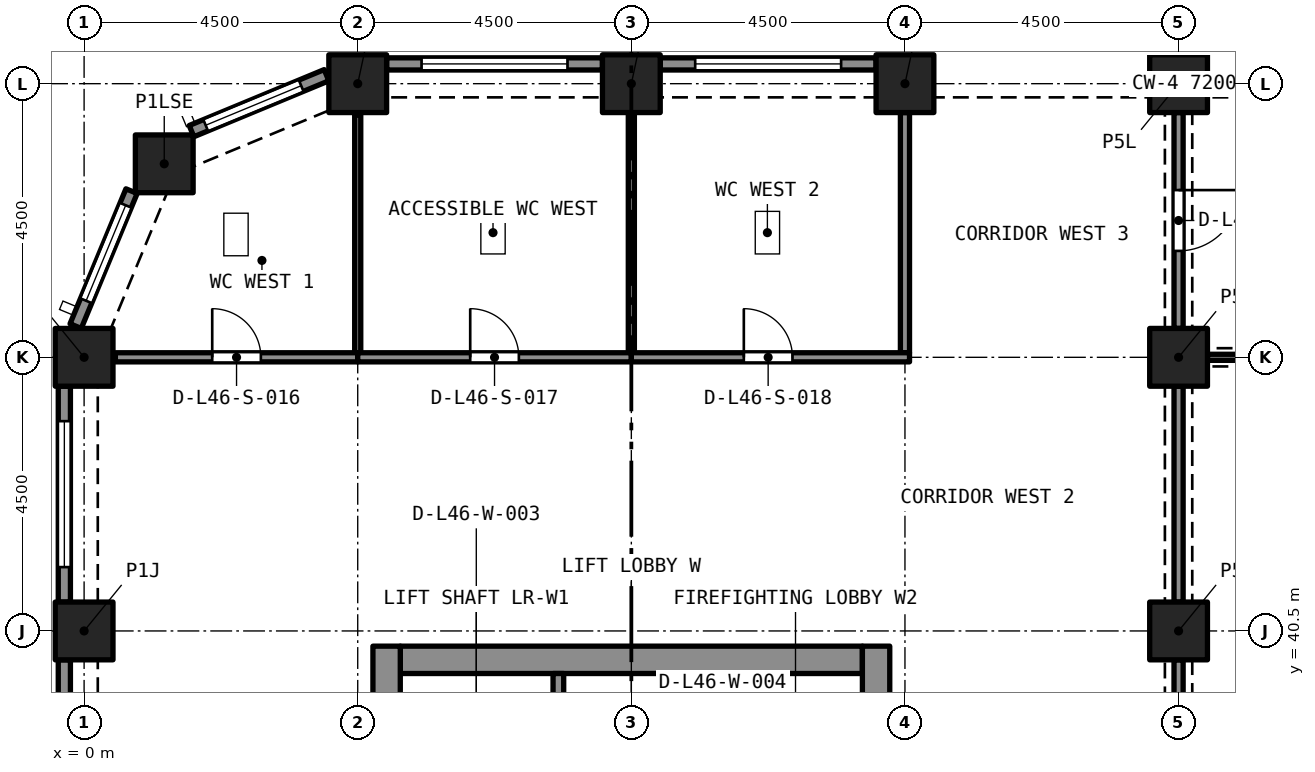
"""IFC4 building model, lengths in metres.
Left out: names, types, materials, properties, quantities, classifications, styles, units other than length and angle.
Written with IfcOpenShell. Run it as: python <this file> out.ifc"""

import sys

from ifc_helpers import new_model, si_unit, direction, frame, frame_2d, origin, origin_2d, place, context, subcontext, project, spatial, rectangle, extrude, element, fill, save


model = new_model("IFC4")
c1 = context("Model", 3, precision=1e-05, world=origin(), true_north=direction((0.0, 1.0)))
c2 = subcontext(c1, "Body", "Model", "MODEL_VIEW")
j1 = project(units=[si_unit("LENGTHUNIT", "METRE"), si_unit("PLANEANGLEUNIT", "RADIAN")], contexts=[c1])
p1 = place(None, origin())
s1 = spatial("IfcSite", under=j1, at=p1, CompositionType="ELEMENT")
p2 = place(p1, origin())
s2 = spatial("IfcBuilding", under=s1, at=p2, CompositionType="ELEMENT")
p3 = place(p2, frame((0.0, 0.0, 168.2)))
s3 = spatial("IfcBuildingStorey", under=s2, at=p3, CompositionType="ELEMENT", Elevation=168.2)
for number, where, z_axis, x_axis in (
    (1, (0.0, 40.5, 0.0), (0.0, 0.0, 1.0), (1.0, 0.0, 0.0)),
    (2, (18.0, 40.5, 0.0), (0.0, 0.0, 1.0), (1.0, 0.0, 0.0)),
    (3, (0.0, 45.0, 0.0), (0.0, 0.0, 1.0), (1.0, 0.0, 0.0)),
    (4, (18.0, 45.0, 0.0), (0.0, 0.0, 1.0), (1.0, 0.0, 0.0)),
    (5, (1.318, 48.182, 0.0), (0.0, 0.0, 1.0), (1.0, 0.0, 0.0)),
    (6, (4.5, 49.5, 0.0), (0.0, 0.0, 1.0), (1.0, 0.0, 0.0)),
    (7, (9.0, 49.5, 0.0), (0.0, 0.0, 1.0), (1.0, 0.0, 0.0)),
    (8, (13.5, 49.5, 0.0), (0.0, 0.0, 1.0), (1.0, 0.0, 0.0)),
    (9, (18.0, 49.5, 0.0), (0.0, 0.0, 1.0), (1.0, 0.0, 0.0)),
):
    element("IfcColumn", number, at=place(p3, frame(where, z_axis=z_axis, x_axis=x_axis)), inside=s3, PredefinedType="COLUMN", context=c2, shape_type="SweptSolid", body=[
        extrude(rectangle(XDim=0.95, YDim=0.95, at=origin_2d()), origin(), (0.0, 0.0, 1.0), 4.4),
    ])
p4 = place(p3, frame((5.2, 40.025, 0.0), z_axis=(0.0, 0.0, 1.0), x_axis=(1.0, 0.0, 0.0)))
e10 = element("IfcWall", 10, at=p4, inside=s3, PredefinedType="SOLIDWALL", context=c2, shape_type="SweptSolid", body=[
    extrude(rectangle(XDim=7.6, YDim=0.45, at=frame_2d((3.8, 0.0))), origin(), (0.0, 0.0, 1.0), 4.4),
])
p5 = place(p3, frame((4.975, 27.25, 0.0), z_axis=(0.0, 0.0, 1.0), x_axis=(0.0, 1.0, 0.0)))
e11 = element("IfcWall", 11, at=p5, inside=s3, PredefinedType="SOLIDWALL", context=c2, shape_type="SweptSolid", body=[
    extrude(rectangle(XDim=13.0, YDim=0.45, at=frame_2d((6.5, 0.0))), origin(), (0.0, 0.0, 1.0), 4.4),
])
p6 = place(p5, frame((8.7, 0.0, 0.0)))
e12 = element("IfcOpeningElement", 12, at=p6, cuts=e11, PredefinedType="OPENING", context=c2, shape_type="SweptSolid", body=[
    extrude(rectangle(XDim=1.2, YDim=2.1, at=frame_2d((0.6, 1.05))), frame((0.0, 0.235, 0.0), z_axis=(0.0, -1.0, 0.0), x_axis=(1.0, 0.0, 0.0)), (0.0, 0.0, 1.0), 0.47),
])
p7 = place(p3, frame((13.025, 27.25, 0.0), z_axis=(0.0, 0.0, 1.0), x_axis=(0.0, 1.0, 0.0)))
e13 = element("IfcWall", 13, at=p7, inside=s3, PredefinedType="SOLIDWALL", context=c2, shape_type="SweptSolid", body=[
    extrude(rectangle(XDim=13.0, YDim=0.45, at=frame_2d((6.5, 0.0))), origin(), (0.0, 0.0, 1.0), 4.4),
])
p8 = place(p7, frame((10.85, 0.0, 0.0)))
e14 = element("IfcOpeningElement", 14, at=p8, cuts=e13, PredefinedType="OPENING", context=c2, shape_type="SweptSolid", body=[
    extrude(rectangle(XDim=1.1, YDim=2.1, at=frame_2d((0.55, 1.05))), frame((0.0, 0.235, 0.0), z_axis=(0.0, -1.0, 0.0), x_axis=(1.0, 0.0, 0.0)), (0.0, 0.0, 1.0), 0.47),
])
p9 = place(p7, frame((8.7, 0.0, 0.0)))
e15 = element("IfcOpeningElement", 15, at=p9, cuts=e13, PredefinedType="OPENING", context=c2, shape_type="SweptSolid", body=[
    extrude(rectangle(XDim=1.2, YDim=2.1, at=frame_2d((0.6, 1.05))), frame((0.0, 0.235, 0.0), z_axis=(0.0, -1.0, 0.0), x_axis=(1.0, 0.0, 0.0)), (0.0, 0.0, 1.0), 0.47),
])
p10 = place(p3, frame((9.475, 49.825, 0.0), z_axis=(0.0, 0.0, 1.0), x_axis=(1.0, 0.0, 0.0)))
e16 = element("IfcWall", 16, at=p10, inside=s3, PredefinedType="SOLIDWALL", context=c2, shape_type="SweptSolid", body=[
    extrude(rectangle(XDim=3.55, YDim=0.2, at=frame_2d((1.775, 0.0))), origin(), (0.0, 0.0, 1.0), 4.4),
])
p11 = place(p10, frame((0.575, 0.0, 0.45)))
e17 = element("IfcOpeningElement", 17, at=p11, cuts=e16, PredefinedType="OPENING", context=c2, shape_type="SweptSolid", body=[
    extrude(rectangle(XDim=2.4, YDim=2.55, at=frame_2d((1.2, 1.275))), frame((0.0, 0.11, 0.0), z_axis=(0.0, -1.0, 0.0), x_axis=(1.0, 0.0, 0.0)), (0.0, 0.0, 1.0), 0.22),
])
p12 = place(p3, frame((4.975, 49.825, 0.0), z_axis=(0.0, 0.0, 1.0), x_axis=(1.0, 0.0, 0.0)))
e18 = element("IfcWall", 18, at=p12, inside=s3, PredefinedType="SOLIDWALL", context=c2, shape_type="SweptSolid", body=[
    extrude(rectangle(XDim=3.55, YDim=0.2, at=frame_2d((1.775, 0.0))), origin(), (0.0, 0.0, 1.0), 4.4),
])
p13 = place(p12, frame((0.575, 0.0, 0.45)))
e19 = element("IfcOpeningElement", 19, at=p13, cuts=e18, PredefinedType="OPENING", context=c2, shape_type="SweptSolid", body=[
    extrude(rectangle(XDim=2.4, YDim=2.55, at=frame_2d((1.2, 1.275))), frame((0.0, 0.11, 0.0), z_axis=(0.0, -1.0, 0.0), x_axis=(1.0, 0.0, 0.0)), (0.0, 0.0, 1.0), 0.22),
])
p14 = place(p3, frame((1.767, 48.72, 0.0), z_axis=(0.0, 0.0, 1.0), x_axis=(0.923880599843, 0.382680855588, 0.0)))
e20 = element("IfcWall", 20, at=p14, inside=s3, PredefinedType="SOLIDWALL", context=c2, shape_type="SweptSolid", body=[
    extrude(rectangle(XDim=2.403, YDim=0.2, at=frame_2d((1.201, 0.0))), origin(), (0.0, 0.0, 1.0), 4.4),
])
p15 = place(p14, frame((0.251, 0.0, 0.45)))
e21 = element("IfcOpeningElement", 21, at=p15, cuts=e20, PredefinedType="OPENING", context=c2, shape_type="SweptSolid", body=[
    extrude(rectangle(XDim=1.7, YDim=2.55, at=frame_2d((0.85, 1.275))), frame((0.0, 0.11, 0.0), z_axis=(0.0, -1.0, 0.0), x_axis=(1.0, 0.0, 0.0)), (0.0, 0.0, 1.0), 0.22),
])
p16 = place(p3, frame((-0.139, 45.513, 0.0), z_axis=(0.0, 0.0, 1.0), x_axis=(0.382680855588, 0.923880599843, 0.0)))
e22 = element("IfcWall", 22, at=p16, inside=s3, PredefinedType="SOLIDWALL", context=c2, shape_type="SweptSolid", body=[
    extrude(rectangle(XDim=2.403, YDim=0.2, at=frame_2d((1.201, 0.0))), origin(), (0.0, 0.0, 1.0), 4.4),
])
p17 = place(p16, frame((0.451, 0.0, 0.45)))
e23 = element("IfcOpeningElement", 23, at=p17, cuts=e22, PredefinedType="OPENING", context=c2, shape_type="SweptSolid", body=[
    extrude(rectangle(XDim=1.7, YDim=2.55, at=frame_2d((0.85, 1.275))), frame((0.0, 0.11, 0.0), z_axis=(0.0, -1.0, 0.0), x_axis=(1.0, 0.0, 0.0)), (0.0, 0.0, 1.0), 0.22),
])
p18 = place(p3, frame((-0.325, 40.975, 0.0), z_axis=(0.0, 0.0, 1.0), x_axis=(0.0, 1.0, 0.0)))
e24 = element("IfcWall", 24, at=p18, inside=s3, PredefinedType="SOLIDWALL", context=c2, shape_type="SweptSolid", body=[
    extrude(rectangle(XDim=3.55, YDim=0.2, at=frame_2d((1.775, 0.0))), origin(), (0.0, 0.0, 1.0), 4.4),
])
p19 = place(p18, frame((0.575, 0.0, 0.45)))
e25 = element("IfcOpeningElement", 25, at=p19, cuts=e24, PredefinedType="OPENING", context=c2, shape_type="SweptSolid", body=[
    extrude(rectangle(XDim=2.4, YDim=2.55, at=frame_2d((1.2, 1.275))), frame((0.0, 0.11, 0.0), z_axis=(0.0, -1.0, 0.0), x_axis=(1.0, 0.0, 0.0)), (0.0, 0.0, 1.0), 0.22),
])
p20 = place(p3, frame((-0.325, 36.475, 0.0), z_axis=(0.0, 0.0, 1.0), x_axis=(0.0, 1.0, 0.0)))
e26 = element("IfcWall", 26, at=p20, inside=s3, PredefinedType="SOLIDWALL", context=c2, shape_type="SweptSolid", body=[
    extrude(rectangle(XDim=3.55, YDim=0.2, at=frame_2d((1.775, 0.0))), origin(), (0.0, 0.0, 1.0), 4.4),
])
p21 = place(p20, frame((0.575, 0.0, 0.45)))
e27 = element("IfcOpeningElement", 27, at=p21, cuts=e26, PredefinedType="OPENING", context=c2, shape_type="SweptSolid", body=[
    extrude(rectangle(XDim=2.4, YDim=2.55, at=frame_2d((1.2, 1.275))), frame((0.0, 0.11, 0.0), z_axis=(0.0, -1.0, 0.0), x_axis=(1.0, 0.0, 0.0)), (0.0, 0.0, 1.0), 0.22),
])
p22 = place(p3, frame((7.8, 37.5, 0.0), z_axis=(0.0, 0.0, 1.0), x_axis=(0.0, 1.0, 0.0)))
e28 = element("IfcWall", 28, at=p22, inside=s3, PredefinedType="SOLIDWALL", context=c2, shape_type="SweptSolid", body=[
    extrude(rectangle(XDim=2.3, YDim=0.175, at=frame_2d((1.15, 0.0))), origin(), (0.0, 0.0, 1.0), 4.1),
])
p23 = place(p3, frame((10.5, 37.5, 0.0), z_axis=(0.0, 0.0, 1.0), x_axis=(0.0, 1.0, 0.0)))
e29 = element("IfcWall", 29, at=p23, inside=s3, PredefinedType="SOLIDWALL", context=c2, shape_type="SweptSolid", body=[
    extrude(rectangle(XDim=2.3, YDim=0.175, at=frame_2d((1.15, 0.0))), origin(), (0.0, 0.0, 1.0), 4.1),
])
p24 = place(p23, frame((0.65, 0.0, 0.0)))
e30 = element("IfcOpeningElement", 30, at=p24, cuts=e29, PredefinedType="OPENING", context=c2, shape_type="SweptSolid", body=[
    extrude(rectangle(XDim=1.0, YDim=2.1, at=frame_2d((0.5, 1.05))), frame((0.0, 0.097, 0.0), z_axis=(0.0, -1.0, 0.0), x_axis=(1.0, 0.0, 0.0)), (0.0, 0.0, 1.0), 0.195),
])
p25 = place(p3, frame((18.475, 45.0, 0.0), z_axis=(0.0, 0.0, 1.0), x_axis=(1.0, 0.0, 0.0)))
e31 = element("IfcWall", 31, at=p25, inside=s3, PredefinedType="PARTITIONING", context=c2, shape_type="SweptSolid", body=[
    extrude(rectangle(XDim=12.55, YDim=0.1, at=frame_2d((6.275, 0.0))), origin(), (0.0, 0.0, 1.0), 3.95),
])
p26 = place(p3, frame((18.0, 40.025, 0.0), z_axis=(0.0, 0.0, 1.0), x_axis=(0.0, -1.0, 0.0)))
e32 = element("IfcWall", 32, at=p26, inside=s3, PredefinedType="PARTITIONING", context=c2, shape_type="SweptSolid", body=[
    extrude(rectangle(XDim=3.55, YDim=0.15, at=frame_2d((1.775, 0.0))), origin(), (0.0, 0.0, 1.0), 3.58),
])
p27 = place(p26, frame((1.175, 0.0, 0.0)))
e33 = element("IfcOpeningElement", 33, at=p27, cuts=e32, PredefinedType="OPENING", context=c2, shape_type="SweptSolid", body=[
    extrude(rectangle(XDim=1.2, YDim=2.1, at=frame_2d((0.6, 1.05))), frame((0.0, 0.085, 0.0), z_axis=(0.0, -1.0, 0.0), x_axis=(1.0, 0.0, 0.0)), (0.0, 0.0, 1.0), 0.17),
])
p28 = place(p3, frame((18.0, 40.975, 0.0), z_axis=(0.0, 0.0, 1.0), x_axis=(0.0, 1.0, 0.0)))
e34 = element("IfcWall", 34, at=p28, inside=s3, PredefinedType="PARTITIONING", context=c2, shape_type="SweptSolid", body=[
    extrude(rectangle(XDim=3.55, YDim=0.15, at=frame_2d((1.775, 0.0))), origin(), (0.0, 0.0, 1.0), 3.58),
])
p29 = place(p3, frame((18.0, 49.025, 0.0), z_axis=(0.0, 0.0, 1.0), x_axis=(0.0, -1.0, 0.0)))
e35 = element("IfcWall", 35, at=p29, inside=s3, PredefinedType="PARTITIONING", context=c2, shape_type="SweptSolid", body=[
    extrude(rectangle(XDim=3.55, YDim=0.15, at=frame_2d((1.775, 0.0))), origin(), (0.0, 0.0, 1.0), 3.58),
])
p30 = place(p29, frame((1.275, 0.0, 0.0)))
e36 = element("IfcOpeningElement", 36, at=p30, cuts=e35, PredefinedType="OPENING", context=c2, shape_type="SweptSolid", body=[
    extrude(rectangle(XDim=1.0, YDim=2.1, at=frame_2d((0.5, 1.05))), frame((0.0, 0.085, 0.0), z_axis=(0.0, -1.0, 0.0), x_axis=(1.0, 0.0, 0.0)), (0.0, 0.0, 1.0), 0.17),
])
p31 = place(p3, frame((4.5, 45.075, 0.0), z_axis=(0.0, 0.0, 1.0), x_axis=(0.0, 1.0, 0.0)))
e37 = element("IfcWall", 37, at=p31, inside=s3, PredefinedType="PARTITIONING", context=c2, shape_type="SweptSolid", body=[
    extrude(rectangle(XDim=3.911, YDim=0.1, at=frame_2d((1.956, 0.0))), origin(), (0.0, 0.0, 1.0), 4.1),
])
p32 = place(p3, frame((0.514, 45.0, 0.0), z_axis=(0.0, 0.0, 1.0), x_axis=(1.0, 0.0, 0.0)))
e38 = element("IfcWall", 38, at=p32, inside=s3, PredefinedType="PARTITIONING", context=c2, shape_type="SweptSolid", body=[
    extrude(rectangle(XDim=3.986, YDim=0.15, at=frame_2d((1.993, 0.0))), origin(), (0.0, 0.0, 1.0), 4.1),
])
p33 = place(p32, frame((1.593, 0.0, 0.0)))
e39 = element("IfcOpeningElement", 39, at=p33, cuts=e38, PredefinedType="OPENING", context=c2, shape_type="SweptSolid", body=[
    extrude(rectangle(XDim=0.8, YDim=2.1, at=frame_2d((0.4, 1.05))), frame((0.0, 0.085, 0.0), z_axis=(0.0, -1.0, 0.0), x_axis=(1.0, 0.0, 0.0)), (0.0, 0.0, 1.0), 0.17),
])
p34 = place(p3, frame((9.0, 45.075, 0.0), z_axis=(0.0, 0.0, 1.0), x_axis=(0.0, 1.0, 0.0)))
e40 = element("IfcWall", 40, at=p34, inside=s3, PredefinedType="PARTITIONING", context=c2, shape_type="SweptSolid", body=[
    extrude(rectangle(XDim=3.95, YDim=0.1, at=frame_2d((1.975, 0.0))), origin(), (0.0, 0.0, 1.0), 4.1),
])
p35 = place(p3, frame((4.5, 45.0, 0.0), z_axis=(0.0, 0.0, 1.0), x_axis=(1.0, 0.0, 0.0)))
e41 = element("IfcWall", 41, at=p35, inside=s3, PredefinedType="PARTITIONING", context=c2, shape_type="SweptSolid", body=[
    extrude(rectangle(XDim=4.5, YDim=0.15, at=frame_2d((2.25, 0.0))), origin(), (0.0, 0.0, 1.0), 4.1),
])
p36 = place(p35, frame((1.85, 0.0, 0.0)))
e42 = element("IfcOpeningElement", 42, at=p36, cuts=e41, PredefinedType="OPENING", context=c2, shape_type="SweptSolid", body=[
    extrude(rectangle(XDim=0.8, YDim=2.1, at=frame_2d((0.4, 1.05))), frame((0.0, 0.085, 0.0), z_axis=(0.0, -1.0, 0.0), x_axis=(1.0, 0.0, 0.0)), (0.0, 0.0, 1.0), 0.17),
])
p37 = place(p3, frame((13.5, 45.075, 0.0), z_axis=(0.0, 0.0, 1.0), x_axis=(0.0, 1.0, 0.0)))
e43 = element("IfcWall", 43, at=p37, inside=s3, PredefinedType="PARTITIONING", context=c2, shape_type="SweptSolid", body=[
    extrude(rectangle(XDim=3.95, YDim=0.15, at=frame_2d((1.975, 0.0))), origin(), (0.0, 0.0, 1.0), 4.1),
])
p38 = place(p3, frame((9.0, 45.0, 0.0), z_axis=(0.0, 0.0, 1.0), x_axis=(1.0, 0.0, 0.0)))
e44 = element("IfcWall", 44, at=p38, inside=s3, PredefinedType="PARTITIONING", context=c2, shape_type="SweptSolid", body=[
    extrude(rectangle(XDim=4.575, YDim=0.15, at=frame_2d((2.288, 0.0))), origin(), (0.0, 0.0, 1.0), 4.1),
])
p39 = place(p38, frame((1.85, 0.0, 0.0)))
e45 = element("IfcOpeningElement", 45, at=p39, cuts=e44, PredefinedType="OPENING", context=c2, shape_type="SweptSolid", body=[
    extrude(rectangle(XDim=0.8, YDim=2.1, at=frame_2d((0.4, 1.05))), frame((0.0, 0.085, 0.0), z_axis=(0.0, -1.0, 0.0), x_axis=(1.0, 0.0, 0.0)), (0.0, 0.0, 1.0), 0.17),
])
p40 = place(p11, origin())
e46 = element("IfcWindow", 46, at=p40, inside=s3, PartitioningType="SINGLE_PANEL", PredefinedType="WINDOW", context=c2, shape_type="SweptSolid", body=[
    extrude(rectangle(XDim=2.4, YDim=2.55, at=frame_2d((1.2, 1.275))), frame((0.0, 0.03, 0.0), z_axis=(0.0, -1.0, 0.0), x_axis=(1.0, 0.0, 0.0)), (0.0, 0.0, 1.0), 0.06),
])
fill(e17, e46)
p41 = place(p13, origin())
e47 = element("IfcWindow", 47, at=p41, inside=s3, PartitioningType="SINGLE_PANEL", PredefinedType="WINDOW", context=c2, shape_type="SweptSolid", body=[
    extrude(rectangle(XDim=2.4, YDim=2.55, at=frame_2d((1.2, 1.275))), frame((0.0, 0.03, 0.0), z_axis=(0.0, -1.0, 0.0), x_axis=(1.0, 0.0, 0.0)), (0.0, 0.0, 1.0), 0.06),
])
fill(e19, e47)
p42 = place(p15, origin())
e48 = element("IfcWindow", 48, at=p42, inside=s3, PartitioningType="SINGLE_PANEL", PredefinedType="WINDOW", context=c2, shape_type="SweptSolid", body=[
    extrude(rectangle(XDim=1.7, YDim=2.55, at=frame_2d((0.85, 1.275))), frame((0.0, 0.03, 0.0), z_axis=(0.0, -1.0, 0.0), x_axis=(1.0, 0.0, 0.0)), (0.0, 0.0, 1.0), 0.06),
])
fill(e21, e48)
p43 = place(p17, origin())
e49 = element("IfcWindow", 49, at=p43, inside=s3, PartitioningType="SINGLE_PANEL", PredefinedType="WINDOW", context=c2, shape_type="SweptSolid", body=[
    extrude(rectangle(XDim=1.7, YDim=2.55, at=frame_2d((0.85, 1.275))), frame((0.0, 0.03, 0.0), z_axis=(0.0, -1.0, 0.0), x_axis=(1.0, 0.0, 0.0)), (0.0, 0.0, 1.0), 0.06),
])
fill(e23, e49)
p44 = place(p19, origin())
e50 = element("IfcWindow", 50, at=p44, inside=s3, PartitioningType="SINGLE_PANEL", PredefinedType="WINDOW", context=c2, shape_type="SweptSolid", body=[
    extrude(rectangle(XDim=2.4, YDim=2.55, at=frame_2d((1.2, 1.275))), frame((0.0, 0.03, 0.0), z_axis=(0.0, -1.0, 0.0), x_axis=(1.0, 0.0, 0.0)), (0.0, 0.0, 1.0), 0.06),
])
fill(e25, e50)
p45 = place(p30, origin())
e51 = element("IfcDoor", 51, at=p45, inside=s3, OperationType="SINGLE_SWING_RIGHT", PredefinedType="DOOR", context=c2, shape_type="SweptSolid", body=[
    extrude(rectangle(XDim=1.0, YDim=2.1, at=frame_2d((0.5, 1.05))), frame((0.0, 0.025, 0.0), z_axis=(0.0, -1.0, 0.0), x_axis=(1.0, 0.0, 0.0)), (0.0, 0.0, 1.0), 0.05),
])
fill(e36, e51)
p46 = place(p33, origin())
e52 = element("IfcDoor", 52, at=p46, inside=s3, OperationType="SINGLE_SWING_LEFT", PredefinedType="DOOR", context=c2, shape_type="SweptSolid", body=[
    extrude(rectangle(XDim=0.8, YDim=2.1, at=frame_2d((0.4, 1.05))), frame((0.0, 0.025, 0.0), z_axis=(0.0, -1.0, 0.0), x_axis=(1.0, 0.0, 0.0)), (0.0, 0.0, 1.0), 0.05),
])
fill(e39, e52)
p47 = place(p36, origin())
e53 = element("IfcDoor", 53, at=p47, inside=s3, OperationType="SINGLE_SWING_RIGHT", PredefinedType="DOOR", context=c2, shape_type="SweptSolid", body=[
    extrude(rectangle(XDim=0.8, YDim=2.1, at=frame_2d((0.4, 1.05))), frame((0.0, 0.025, 0.0), z_axis=(0.0, -1.0, 0.0), x_axis=(1.0, 0.0, 0.0)), (0.0, 0.0, 1.0), 0.05),
])
fill(e42, e53)
p48 = place(p39, origin())
e54 = element("IfcDoor", 54, at=p48, inside=s3, OperationType="SINGLE_SWING_LEFT", PredefinedType="DOOR", context=c2, shape_type="SweptSolid", body=[
    extrude(rectangle(XDim=0.8, YDim=2.1, at=frame_2d((0.4, 1.05))), frame((0.0, 0.025, 0.0), z_axis=(0.0, -1.0, 0.0), x_axis=(1.0, 0.0, 0.0)), (0.0, 0.0, 1.0), 0.05),
])
fill(e45, e54)
save(model, sys.argv[1])
